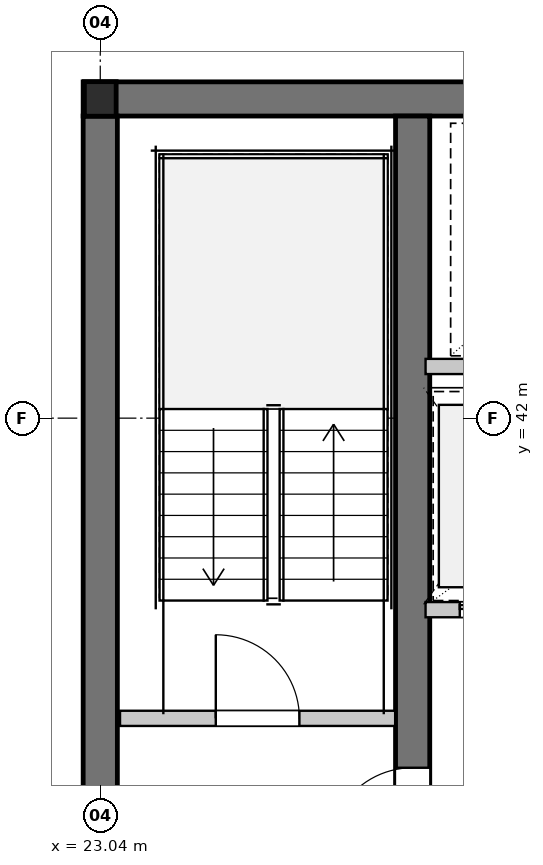
"""IFC4 building model, lengths in metres.
Left out: names, types, materials, properties, quantities, classifications, styles, units other than length and angle.
Written with IfcOpenShell. Run it as: python <this file> out.ifc"""

import sys

from ifc_helpers import new_model, si_unit, direction, frame, frame_2d, origin, origin_2d, place, context, subcontext, project, spatial, rectangle, i_section, extrude, element, fill, save


model = new_model("IFC4")
c1 = context("Model", 3, precision=1e-05, world=origin(), true_north=direction((0.0, 1.0)))
c2 = subcontext(c1, "Body", "Model", "MODEL_VIEW")
j1 = project(units=[si_unit("LENGTHUNIT", "METRE"), si_unit("PLANEANGLEUNIT", "RADIAN")], contexts=[c1])
p1 = place(None, origin())
s1 = spatial("IfcSite", under=j1, at=p1, CompositionType="ELEMENT")
p2 = place(p1, origin())
s2 = spatial("IfcBuilding", under=s1, at=p2, CompositionType="ELEMENT")
p3 = place(p2, frame((0.0, 0.0, 165.5)))
s3 = spatial("IfcBuildingStorey", under=s2, at=p3, CompositionType="ELEMENT", Elevation=165.5)
p4 = place(p3, frame((22.815, 46.2, 0.0), z_axis=(0.0, 0.0, 1.0), x_axis=(1.0, 0.0, 0.0)))
e1 = element("IfcWall", 1, at=p4, inside=s3, PredefinedType="SHEAR", context=c2, shape_type="SweptSolid", body=[
    extrude(rectangle(XDim=31.17, YDim=0.45, at=frame_2d((15.585, 0.0))), origin(), (0.0, 0.0, 1.0), 3.08),
])
p5 = place(p3, frame((23.04, 35.625, 0.0), z_axis=(0.0, 0.0, 1.0), x_axis=(0.0, 1.0, 0.0)))
e2 = element("IfcWall", 2, at=p5, inside=s3, PredefinedType="SHEAR", context=c2, shape_type="SweptSolid", body=[
    extrude(rectangle(XDim=10.35, YDim=0.45, at=frame_2d((5.175, 0.0))), origin(), (0.0, 0.0, 1.0), 3.08),
])
p6 = place(p3, frame((27.15, 35.625, 0.0), z_axis=(0.0, 0.0, 1.0), x_axis=(0.0, 1.0, 0.0)))
e3 = element("IfcWall", 3, at=p6, inside=s3, PredefinedType="SHEAR", context=c2, shape_type="SweptSolid", body=[
    extrude(rectangle(XDim=10.35, YDim=0.45, at=frame_2d((5.175, 0.0))), origin(), (0.0, 0.0, 1.0), 3.08),
])
p7 = place(p6, frame((0.675, 0.0, 0.0)))
e4 = element("IfcOpeningElement", 4, at=p7, cuts=e3, PredefinedType="OPENING", context=c2, shape_type="SweptSolid", body=[
    extrude(rectangle(XDim=1.1, YDim=2.15, at=frame_2d((0.55, 1.075))), frame((0.0, 0.235, 0.0), z_axis=(0.0, -1.0, 0.0), x_axis=(1.0, 0.0, 0.0)), (0.0, 0.0, 1.0), 0.47),
])
p8 = place(p3, frame((23.04, 46.2, 0.0), z_axis=(0.0, 0.0, 1.0), x_axis=(1.0, 0.0, 0.0)))
e5 = element("IfcColumn", 5, at=p8, inside=s3, PredefinedType="COLUMN", context=c2, shape_type="SweptSolid", body=[
    extrude(i_section(OverallWidth=0.418, OverallDepth=0.455, WebThickness=0.042, FlangeThickness=0.068, FilletRadius=0.015, at=origin_2d()), origin(), (0.0, 0.0, 1.0), 3.3),
])
p9 = place(p3, frame((23.3, 38.05, 0.0), z_axis=(0.0, 0.0, 1.0), x_axis=(1.0, 0.0, 0.0)))
e6 = element("IfcWall", 6, at=p9, inside=s3, PredefinedType="PARTITIONING", context=c2, shape_type="SweptSolid", body=[
    extrude(rectangle(XDim=3.62, YDim=0.2, at=frame_2d((1.81, 0.0))), origin(), (0.0, 0.0, 1.0), 3.08),
])
p10 = place(p9, frame((1.26, 0.0, 0.0)))
e7 = element("IfcOpeningElement", 7, at=p10, cuts=e6, PredefinedType="OPENING", context=c2, shape_type="SweptSolid", body=[
    extrude(rectangle(XDim=1.1, YDim=2.15, at=frame_2d((0.55, 1.075))), frame((0.0, 0.11, 0.0), z_axis=(0.0, -1.0, 0.0), x_axis=(1.0, 0.0, 0.0)), (0.0, 0.0, 1.0), 0.22),
])
p11 = place(p3, frame((27.32, 39.48, 0.0), z_axis=(0.0, 0.0, 1.0), x_axis=(1.0, 0.0, 0.0)))
e8 = element("IfcWall", 8, at=p11, inside=s3, PredefinedType="PARTITIONING", context=c2, shape_type="SweptSolid", body=[
    extrude(rectangle(XDim=3.94, YDim=0.2, at=frame_2d((1.97, 0.0))), origin(), (0.0, 0.0, 1.0), 3.08),
])
p12 = place(p11, frame((0.45, 0.0, 0.0)))
e9 = element("IfcOpeningElement", 9, at=p12, cuts=e8, PredefinedType="OPENING", context=c2, shape_type="SweptSolid", body=[
    extrude(rectangle(XDim=1.1, YDim=2.2, at=frame_2d((0.55, 1.1))), frame((0.0, 0.11, 0.0), z_axis=(0.0, -1.0, 0.0), x_axis=(1.0, 0.0, 0.0)), (0.0, 0.0, 1.0), 0.22),
])
p13 = place(p11, frame((2.41, 0.0, 0.0)))
e10 = element("IfcOpeningElement", 10, at=p13, cuts=e8, PredefinedType="OPENING", context=c2, shape_type="SweptSolid", body=[
    extrude(rectangle(XDim=1.1, YDim=2.2, at=frame_2d((0.55, 1.1))), frame((0.0, 0.11, 0.0), z_axis=(0.0, -1.0, 0.0), x_axis=(1.0, 0.0, 0.0)), (0.0, 0.0, 1.0), 0.22),
])
p14 = place(p3, frame((27.32, 42.68, 0.0), z_axis=(0.0, 0.0, 1.0), x_axis=(1.0, 0.0, 0.0)))
e11 = element("IfcWall", 11, at=p14, inside=s3, PredefinedType="PARTITIONING", context=c2, shape_type="SweptSolid", body=[
    extrude(rectangle(XDim=5.33, YDim=0.2, at=frame_2d((2.665, 0.0))), origin(), (0.0, 0.0, 1.0), 3.08),
])
p15 = place(p14, frame((4.18, 0.0, 0.0)))
e12 = element("IfcOpeningElement", 12, at=p15, cuts=e11, PredefinedType="OPENING", context=c2, shape_type="SweptSolid", body=[
    extrude(rectangle(XDim=0.9, YDim=2.15, at=frame_2d((0.45, 1.075))), frame((0.0, 0.11, 0.0), z_axis=(0.0, -1.0, 0.0), x_axis=(1.0, 0.0, 0.0)), (0.0, 0.0, 1.0), 0.22),
])
p16 = place(p10, origin())
e13 = element("IfcDoor", 13, at=p16, inside=s3, OperationType="SINGLE_SWING_LEFT", PredefinedType="DOOR", context=c2, shape_type="SweptSolid", body=[
    extrude(rectangle(XDim=1.1, YDim=2.15, at=frame_2d((0.55, 1.075))), frame((0.0, 0.025, 0.0), z_axis=(0.0, -1.0, 0.0), x_axis=(1.0, 0.0, 0.0)), (0.0, 0.0, 1.0), 0.05),
])
fill(e7, e13)
p17 = place(p12, origin())
e14 = element("IfcDoor", 14, at=p17, inside=s3, OperationType="DOUBLE_DOOR_SLIDING", PredefinedType="DOOR", context=c2, shape_type="SweptSolid", body=[
    extrude(rectangle(XDim=1.1, YDim=2.2, at=frame_2d((0.55, 1.1))), frame((0.0, 0.025, 0.0), z_axis=(0.0, -1.0, 0.0), x_axis=(1.0, 0.0, 0.0)), (0.0, 0.0, 1.0), 0.05),
])
fill(e9, e14)
p18 = place(p7, origin())
e15 = element("IfcDoor", 15, at=p18, inside=s3, OperationType="SINGLE_SWING_LEFT", PredefinedType="DOOR", context=c2, shape_type="SweptSolid", body=[
    extrude(rectangle(XDim=1.1, YDim=2.15, at=frame_2d((0.55, 1.075))), frame((0.0, 0.025, 0.0), z_axis=(0.0, -1.0, 0.0), x_axis=(1.0, 0.0, 0.0)), (0.0, 0.0, 1.0), 0.05),
])
fill(e4, e15)
save(model, sys.argv[1])
